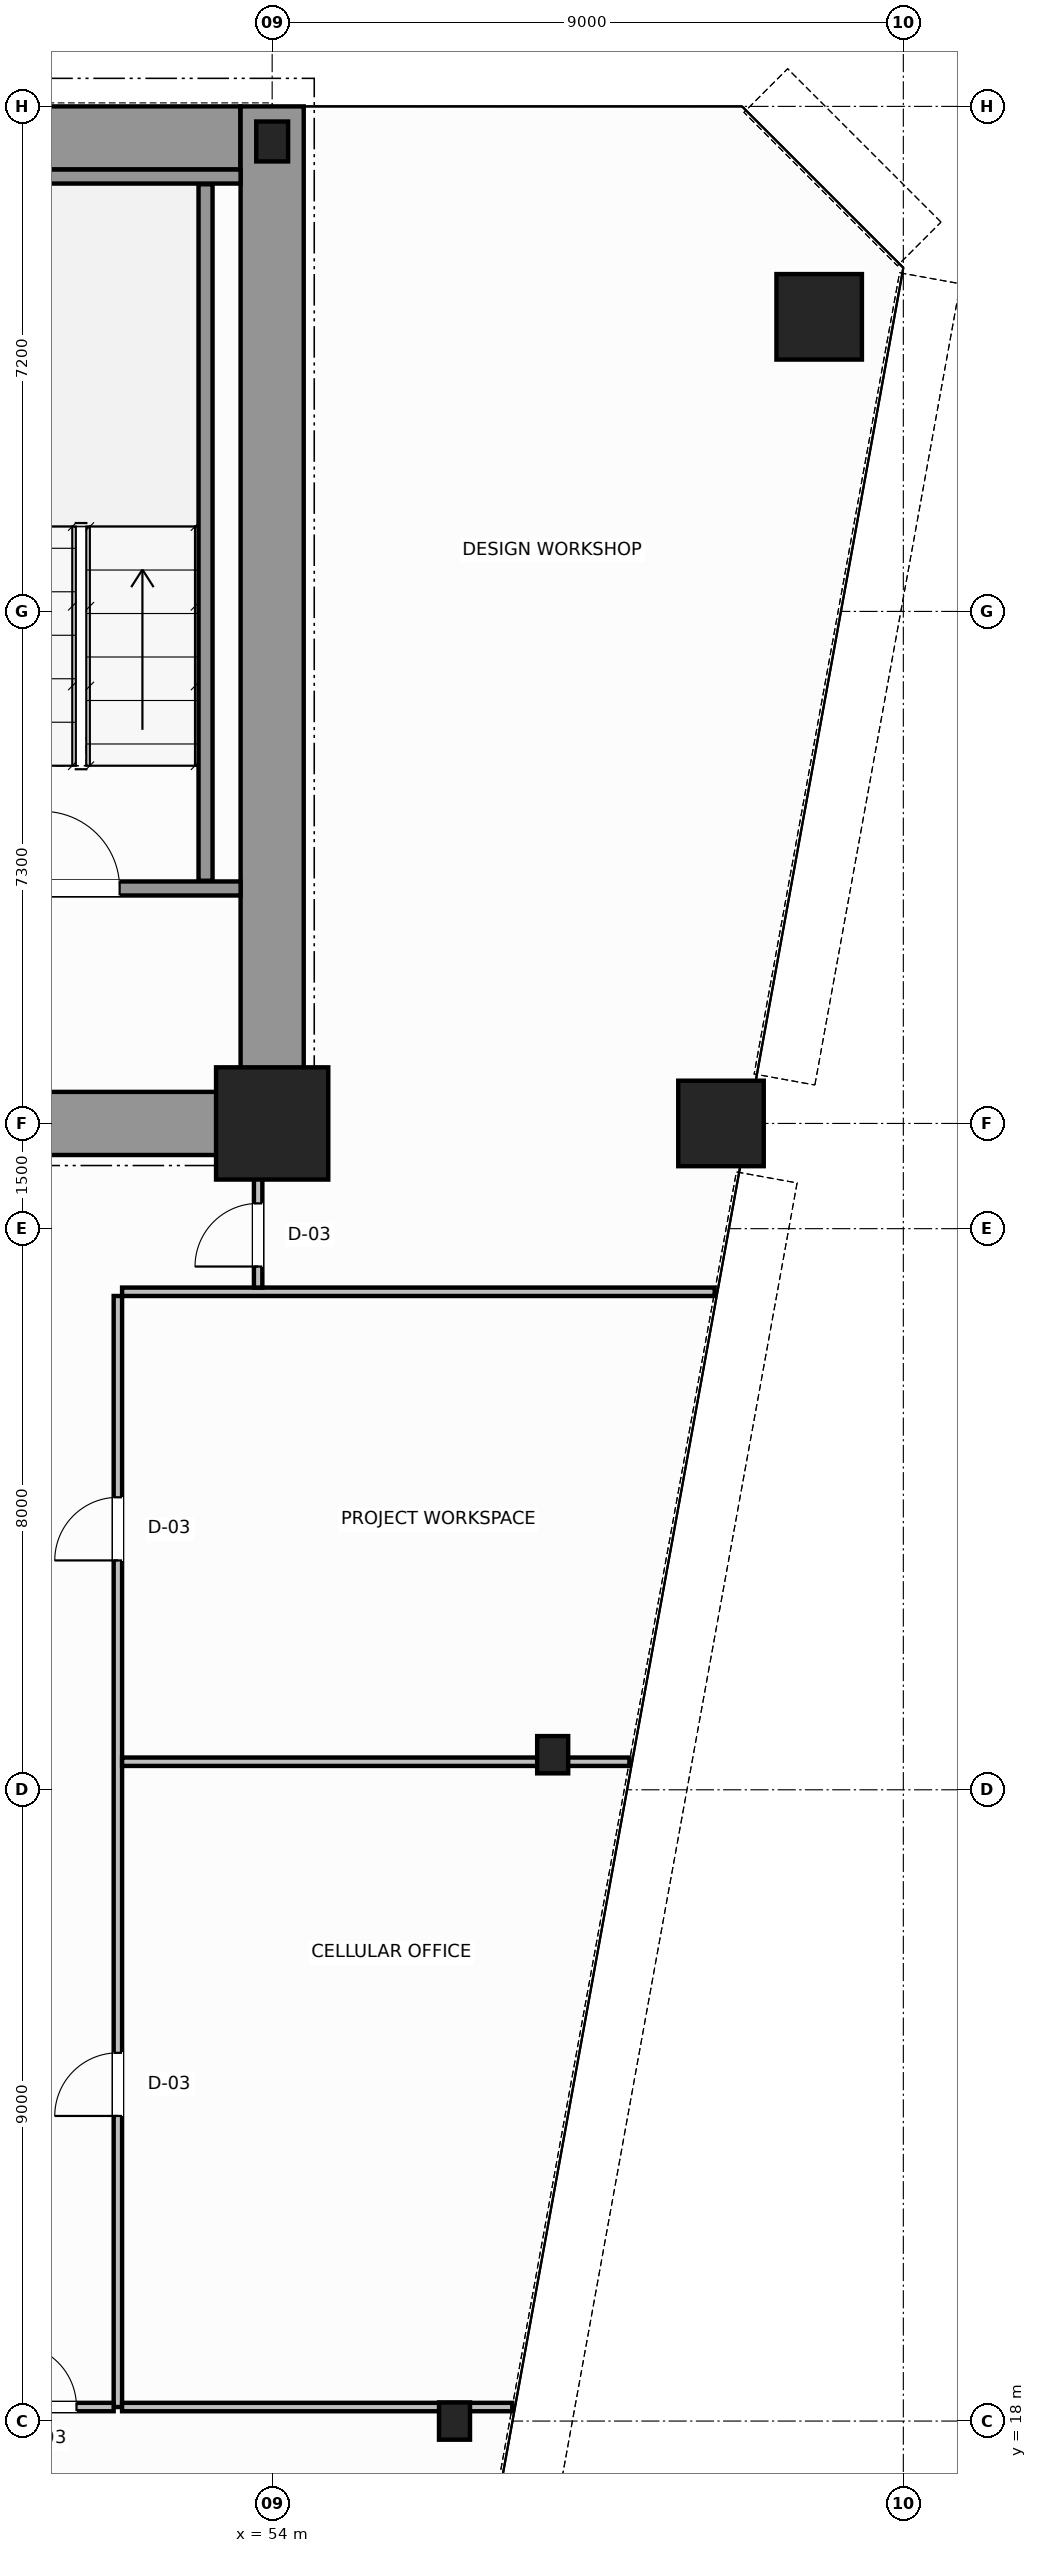
"""IFC4 building model, lengths in metres.
Left out: names, types, materials, properties, quantities, classifications, styles, units other than length and angle.
Written with IfcOpenShell. Run it as: python <this file> out.ifc"""

import sys

from ifc_helpers import new_model, si_unit, direction, frame, frame_2d, origin, origin_2d, place, context, subcontext, project, spatial, rectangle, hollow_circle, i_section, extrude, source, transform, mapped, element, fill, save


model = new_model("IFC4")
c1 = context("Model", 3, precision=1e-05, world=origin(), true_north=direction((0.0, 1.0)))
c2 = subcontext(c1, "Body", "Model", "MODEL_VIEW")
j1 = project(units=[si_unit("LENGTHUNIT", "METRE"), si_unit("PLANEANGLEUNIT", "RADIAN")], contexts=[c1])
p1 = place(None, origin())
s1 = spatial("IfcSite", under=j1, at=p1, CompositionType="ELEMENT")
p2 = place(p1, origin())
s2 = spatial("IfcBuilding", under=s1, at=p2, CompositionType="ELEMENT")
p3 = place(p2, frame((0.0, 0.0, 26.4)))
s3 = spatial("IfcBuildingStorey", under=s2, at=p3, CompositionType="ELEMENT", Elevation=26.4)
m1 = source(origin(), c2, "Body", "SweptSolid", [
    extrude(rectangle(XDim=1.6, YDim=1.6, at=origin_2d()), origin(), (0.0, 0.0, 1.0), 3.8),
])
p4 = place(p3, frame((54.0, 36.5, 0.0), z_axis=(0.0, 0.0, 1.0), x_axis=(1.0, 0.0, 0.0)))
e1 = element("IfcColumn", 1, at=p4, inside=s3, PredefinedType="COLUMN", context=c2, shape_type="MappedRepresentation", body=[
    mapped(m1, transform((0.0, 0.0, 0.0), scale=1.0)),
])
m2 = source(origin(), c2, "Body", "SweptSolid", [
    extrude(i_section(OverallWidth=0.454, OverallDepth=0.569, WebThickness=0.078, FlangeThickness=0.08, FilletRadius=0.015, at=origin_2d()), origin(), (0.0, 0.0, 1.0), 3.8),
])
p5 = place(p3, frame((54.0, 50.5, 0.0), z_axis=(0.0, 0.0, 1.0), x_axis=(1.0, 0.0, 0.0)))
e2 = element("IfcColumn", 2, at=p5, inside=s3, PredefinedType="COLUMN", context=c2, shape_type="MappedRepresentation", body=[
    mapped(m2, transform((0.0, 0.0, 0.0), scale=1.0)),
])
m3 = source(origin(), c2, "Body", "SweptSolid", [
    extrude(hollow_circle(Radius=0.61, WallThickness=0.05, at=origin_2d()), origin(), (0.0, 0.0, 1.0), 3.8),
])
for number, where, z_axis, x_axis in (
    (3, (61.8, 48.0, 0.0), (0.0, 0.0, 1.0), (1.0, 0.0, 0.0)),
    (4, (60.4, 36.5, 0.0), (0.0, 0.0, 1.0), (1.0, 0.0, 0.0)),
):
    element("IfcColumn", number, at=place(p3, frame(where, z_axis=z_axis, x_axis=x_axis)), inside=s3, PredefinedType="COLUMN", context=c2, shape_type="MappedRepresentation", body=[
        mapped(m3, transform((0.0, 0.0, 0.0), scale=1.0)),
    ])
m4 = source(origin(), c2, "Body", "SweptSolid", [
    extrude(i_section(OverallWidth=0.442, OverallDepth=0.531, WebThickness=0.065, FlangeThickness=0.076, FilletRadius=0.015, at=origin_2d()), origin(), (0.0, 0.0, 1.0), 3.8),
])
for number, where, z_axis, x_axis in (
    (5, (58.0, 27.5, 0.0), (0.0, 0.0, 1.0), (1.0, 0.0, 0.0)),
    (6, (56.6, 18.0, 0.0), (0.0, 0.0, 1.0), (1.0, 0.0, 0.0)),
):
    element("IfcColumn", number, at=place(p3, frame(where, z_axis=z_axis, x_axis=x_axis)), inside=s3, PredefinedType="COLUMN", context=c2, shape_type="MappedRepresentation", body=[
        mapped(m4, transform((0.0, 0.0, 0.0), scale=1.0)),
    ])
p6 = place(p3, frame((34.002, 50.55, 0.0), z_axis=(0.0, 0.0, 1.0), x_axis=(1.0, 0.0, 0.0)))
e7 = element("IfcWall", 7, at=p6, inside=s3, PredefinedType="SHEAR", context=c2, shape_type="SweptSolid", body=[
    extrude(rectangle(XDim=19.544, YDim=0.9, at=frame_2d((9.772, 0.0))), origin(), (0.0, 0.0, 1.0), 3.8),
])
p7 = place(p3, frame((54.0, 36.5, 0.0), z_axis=(0.0, 0.0, 1.0), x_axis=(0.0, 1.0, 0.0)))
e8 = element("IfcWall", 8, at=p7, inside=s3, PredefinedType="SHEAR", context=c2, shape_type="SweptSolid", body=[
    extrude(rectangle(XDim=14.5, YDim=0.9, at=frame_2d((7.25, 0.0))), origin(), (0.0, 0.0, 1.0), 3.8),
])
p8 = place(p3, frame((49.8, 36.5, 0.0), z_axis=(0.0, 0.0, 1.0), x_axis=(1.0, 0.0, 0.0)))
e9 = element("IfcWall", 9, at=p8, inside=s3, PredefinedType="SHEAR", context=c2, shape_type="SweptSolid", body=[
    extrude(rectangle(XDim=3.73, YDim=0.9, at=frame_2d((1.865, 0.0))), origin(), (0.0, 0.0, 1.0), 2.38),
])
p9 = place(p3, frame((49.4, 39.85, 0.0), z_axis=(0.0, 0.0, 1.0), x_axis=(1.0, 0.0, 0.0)))
e10 = element("IfcWall", 10, at=p9, inside=s3, PredefinedType="SOLIDWALL", context=c2, shape_type="SweptSolid", body=[
    extrude(rectangle(XDim=4.15, YDim=0.2, at=frame_2d((2.075, 0.0))), origin(), (0.0, 0.0, 1.0), 3.8),
])
p10 = place(p9, frame((1.325, 0.0, 0.0)))
e11 = element("IfcOpeningElement", 11, at=p10, cuts=e10, PredefinedType="OPENING", context=c2, shape_type="SweptSolid", body=[
    extrude(rectangle(XDim=1.1, YDim=2.15, at=frame_2d((0.55, 1.075))), frame((0.0, 0.11, 0.0), z_axis=(0.0, -1.0, 0.0), x_axis=(1.0, 0.0, 0.0)), (0.0, 0.0, 1.0), 0.22),
])
p11 = place(p3, frame((49.4, 50.0, 0.0), z_axis=(0.0, 0.0, 1.0), x_axis=(1.0, 0.0, 0.0)))
e12 = element("IfcWall", 12, at=p11, inside=s3, PredefinedType="SOLIDWALL", context=c2, shape_type="SweptSolid", body=[
    extrude(rectangle(XDim=4.15, YDim=0.2, at=frame_2d((2.075, 0.0))), origin(), (0.0, 0.0, 1.0), 3.8),
])
p12 = place(p3, frame((53.05, 39.96, 0.0), z_axis=(0.0, 0.0, 1.0), x_axis=(0.0, 1.0, 0.0)))
e13 = element("IfcWall", 13, at=p12, inside=s3, PredefinedType="SOLIDWALL", context=c2, shape_type="SweptSolid", body=[
    extrude(rectangle(XDim=9.93, YDim=0.2, at=frame_2d((4.965, 0.0))), origin(), (0.0, 0.0, 1.0), 3.8),
])
p13 = place(p3, frame((51.86, 34.1, 0.0), z_axis=(0.0, 0.0, 1.0), x_axis=(1.0, 0.0, 0.0)))
e14 = element("IfcWall", 14, at=p13, inside=s3, PredefinedType="PARTITIONING", context=c2, shape_type="SweptSolid", body=[
    extrude(rectangle(XDim=8.45, YDim=0.12, at=frame_2d((4.225, 0.0))), origin(), (0.0, 0.0, 1.0), 3.58),
])
p14 = place(p3, frame((53.8, 34.16, 0.0), z_axis=(0.0, 0.0, 1.0), x_axis=(0.0, 1.0, 0.0)))
e15 = element("IfcWall", 15, at=p14, inside=s3, PredefinedType="PARTITIONING", context=c2, shape_type="SweptSolid", body=[
    extrude(rectangle(XDim=2.28, YDim=0.12, at=frame_2d((1.14, 0.0))), origin(), (0.0, 0.0, 1.0), 3.58),
])
p15 = place(p14, frame((0.3, 0.0, 0.0)))
e16 = element("IfcOpeningElement", 16, at=p15, cuts=e15, PredefinedType="OPENING", context=c2, shape_type="SweptSolid", body=[
    extrude(rectangle(XDim=0.9, YDim=2.15, at=frame_2d((0.45, 1.075))), frame((0.0, 0.07, 0.0), z_axis=(0.0, -1.0, 0.0), x_axis=(1.0, 0.0, 0.0)), (0.0, 0.0, 1.0), 0.14),
])
p16 = place(p3, frame((51.8, 18.2, 0.0), z_axis=(0.0, 0.0, 1.0), x_axis=(0.0, 1.0, 0.0)))
e17 = element("IfcWall", 17, at=p16, inside=s3, PredefinedType="PARTITIONING", context=c2, shape_type="SweptSolid", body=[
    extrude(rectangle(XDim=15.84, YDim=0.12, at=frame_2d((7.92, 0.0))), origin(), (0.0, 0.0, 1.0), 3.58),
])
p17 = place(p16, frame((4.15, 0.0, 0.0)))
e18 = element("IfcOpeningElement", 18, at=p17, cuts=e17, PredefinedType="OPENING", context=c2, shape_type="SweptSolid", body=[
    extrude(rectangle(XDim=0.9, YDim=2.15, at=frame_2d((0.45, 1.075))), frame((0.0, 0.07, 0.0), z_axis=(0.0, -1.0, 0.0), x_axis=(1.0, 0.0, 0.0)), (0.0, 0.0, 1.0), 0.14),
])
p18 = place(p16, frame((12.07, 0.0, 0.0)))
e19 = element("IfcOpeningElement", 19, at=p18, cuts=e17, PredefinedType="OPENING", context=c2, shape_type="SweptSolid", body=[
    extrude(rectangle(XDim=0.9, YDim=2.15, at=frame_2d((0.45, 1.075))), frame((0.0, 0.07, 0.0), z_axis=(0.0, -1.0, 0.0), x_axis=(1.0, 0.0, 0.0)), (0.0, 0.0, 1.0), 0.14),
])
p19 = place(p3, frame((49.86, 18.2, 0.0), z_axis=(0.0, 0.0, 1.0), x_axis=(1.0, 0.0, 0.0)))
e20 = element("IfcWall", 20, at=p19, inside=s3, PredefinedType="PARTITIONING", context=c2, shape_type="SweptSolid", body=[
    extrude(rectangle(XDim=1.88, YDim=0.12, at=frame_2d((0.94, 0.0))), origin(), (0.0, 0.0, 1.0), 2.77),
])
p20 = place(p19, frame((0.45, 0.0, 0.0)))
e21 = element("IfcOpeningElement", 21, at=p20, cuts=e20, PredefinedType="OPENING", context=c2, shape_type="SweptSolid", body=[
    extrude(rectangle(XDim=0.9, YDim=2.15, at=frame_2d((0.45, 1.075))), frame((0.0, 0.07, 0.0), z_axis=(0.0, -1.0, 0.0), x_axis=(1.0, 0.0, 0.0)), (0.0, 0.0, 1.0), 0.14),
])
p21 = place(p3, frame((51.86, 18.2, 0.0), z_axis=(0.0, 0.0, 1.0), x_axis=(1.0, 0.0, 0.0)))
e22 = element("IfcWall", 22, at=p21, inside=s3, PredefinedType="PARTITIONING", context=c2, shape_type="SweptSolid", body=[
    extrude(rectangle(XDim=5.563, YDim=0.12, at=frame_2d((2.782, 0.0))), origin(), (0.0, 0.0, 1.0), 2.77),
])
p22 = place(p3, frame((51.86, 27.4, 0.0), z_axis=(0.0, 0.0, 1.0), x_axis=(1.0, 0.0, 0.0)))
e23 = element("IfcWall", 23, at=p22, inside=s3, PredefinedType="PARTITIONING", context=c2, shape_type="SweptSolid", body=[
    extrude(rectangle(XDim=7.233, YDim=0.12, at=frame_2d((3.617, 0.0))), origin(), (0.0, 0.0, 1.0), 2.77),
])
m5 = source(origin(), c2, "Body", "SweptSolid", [
    extrude(rectangle(XDim=1.1, YDim=2.15, at=frame_2d((0.55, 1.075))), frame((0.0, 0.025, 0.0), z_axis=(0.0, -1.0, 0.0), x_axis=(1.0, 0.0, 0.0)), (0.0, 0.0, 1.0), 0.05),
])
p23 = place(p10, origin())
e24 = element("IfcDoor", 24, at=p23, inside=s3, OperationType="SINGLE_SWING_RIGHT", PredefinedType="DOOR", context=c2, shape_type="MappedRepresentation", body=[
    mapped(m5, transform((0.0, 0.0, 0.0), scale=1.0)),
])
fill(e11, e24)
m6 = source(origin(), c2, "Body", "SweptSolid", [
    extrude(rectangle(XDim=0.9, YDim=2.15, at=frame_2d((0.45, 1.075))), frame((0.0, 0.025, 0.0), z_axis=(0.0, -1.0, 0.0), x_axis=(1.0, 0.0, 0.0)), (0.0, 0.0, 1.0), 0.05),
])
p24 = place(p15, origin())
e25 = element("IfcDoor", 25, at=p24, inside=s3, OperationType="SINGLE_SWING_RIGHT", PredefinedType="DOOR", context=c2, shape_type="MappedRepresentation", body=[
    mapped(m6, transform((0.0, 0.0, 0.0), scale=1.0)),
])
fill(e16, e25)
p25 = place(p17, origin())
e26 = element("IfcDoor", 26, at=p25, inside=s3, OperationType="SINGLE_SWING_RIGHT", PredefinedType="DOOR", context=c2, shape_type="MappedRepresentation", body=[
    mapped(m6, transform((0.0, 0.0, 0.0), scale=1.0)),
])
fill(e18, e26)
p26 = place(p18, origin())
e27 = element("IfcDoor", 27, at=p26, inside=s3, OperationType="SINGLE_SWING_LEFT", PredefinedType="DOOR", context=c2, shape_type="MappedRepresentation", body=[
    mapped(m6, transform((0.0, 0.0, 0.0), scale=1.0)),
])
fill(e19, e27)
p27 = place(p20, origin())
e28 = element("IfcDoor", 28, at=p27, inside=s3, OperationType="SINGLE_SWING_RIGHT", PredefinedType="DOOR", context=c2, shape_type="MappedRepresentation", body=[
    mapped(m6, transform((0.0, 0.0, 0.0), scale=1.0)),
])
fill(e21, e28)
save(model, sys.argv[1])
